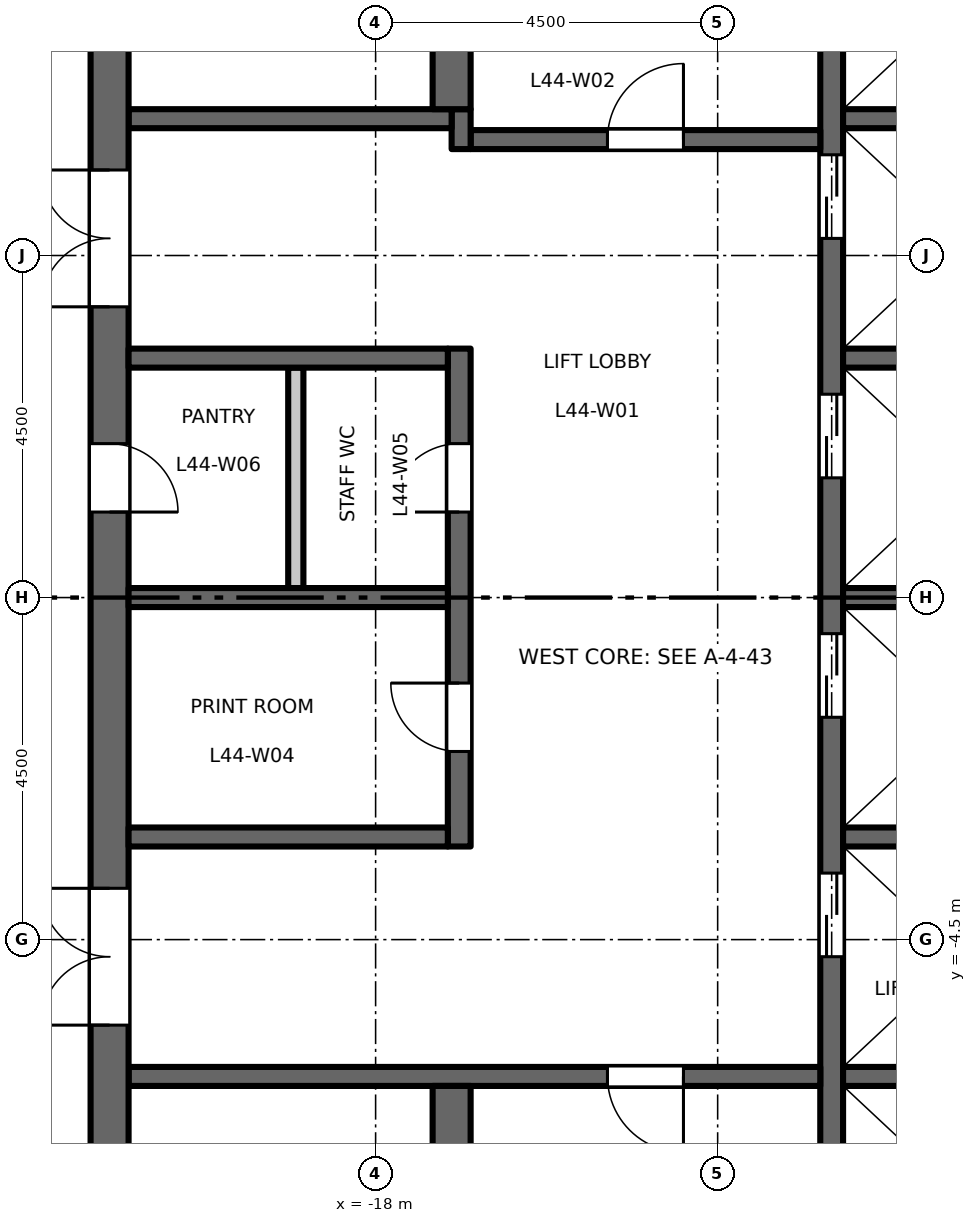
"""IFC4 building model, lengths in metres.
Left out: names, types, materials, properties, quantities, classifications, styles, units other than length and angle.
Written with IfcOpenShell. Run it as: python <this file> out.ifc"""

import sys

from ifc_helpers import new_model, si_unit, direction, frame, frame_2d, origin, place, context, subcontext, project, spatial, rectangle, extrude, element, fill, save


model = new_model("IFC4")
c1 = context("Model", 3, precision=1e-05, world=origin(), true_north=direction((0.0, 1.0)))
c2 = subcontext(c1, "Body", "Model", "MODEL_VIEW")
j1 = project(units=[si_unit("LENGTHUNIT", "METRE"), si_unit("PLANEANGLEUNIT", "RADIAN")], contexts=[c1])
p1 = place(None, origin())
s1 = spatial("IfcSite", under=j1, at=p1, CompositionType="ELEMENT")
p2 = place(p1, origin())
s2 = spatial("IfcBuilding", under=s1, at=p2, CompositionType="ELEMENT")
p3 = place(p2, frame((0.0, 0.0, 206.2)))
s3 = spatial("IfcBuildingStorey", under=s2, at=p3, CompositionType="ELEMENT", Elevation=206.2)
p4 = place(p3, frame((-12.0, -9.45, 0.0), z_axis=(0.0, 0.0, 1.0), x_axis=(0.0, 1.0, 0.0)))
e1 = element("IfcWall", 1, at=p4, inside=s3, PredefinedType="SHEAR", context=c2, shape_type="SweptSolid", body=[
    extrude(rectangle(XDim=18.9, YDim=0.3, at=frame_2d((9.45, 0.0))), origin(), (0.0, 0.0, 1.0), 4.35),
])
p5 = place(p4, frame((4.725, 0.0, 0.0)))
e2 = element("IfcOpeningElement", 2, at=p5, cuts=e1, PredefinedType="OPENING", context=c2, shape_type="SweptSolid", body=[
    extrude(rectangle(XDim=1.1, YDim=2.1, at=frame_2d((0.55, 1.05))), frame((0.0, 0.16, 0.0), z_axis=(0.0, -1.0, 0.0), x_axis=(1.0, 0.0, 0.0)), (0.0, 0.0, 1.0), 0.32),
])
p6 = place(p4, frame((7.875, 0.0, 0.0)))
e3 = element("IfcOpeningElement", 3, at=p6, cuts=e1, PredefinedType="OPENING", context=c2, shape_type="SweptSolid", body=[
    extrude(rectangle(XDim=1.1, YDim=2.1, at=frame_2d((0.55, 1.05))), frame((0.0, 0.16, 0.0), z_axis=(0.0, -1.0, 0.0), x_axis=(1.0, 0.0, 0.0)), (0.0, 0.0, 1.0), 0.32),
])
p7 = place(p4, frame((11.025, 0.0, 0.0)))
e4 = element("IfcOpeningElement", 4, at=p7, cuts=e1, PredefinedType="OPENING", context=c2, shape_type="SweptSolid", body=[
    extrude(rectangle(XDim=1.1, YDim=2.1, at=frame_2d((0.55, 1.05))), frame((0.0, 0.16, 0.0), z_axis=(0.0, -1.0, 0.0), x_axis=(1.0, 0.0, 0.0)), (0.0, 0.0, 1.0), 0.32),
])
p8 = place(p4, frame((14.175, 0.0, 0.0)))
e5 = element("IfcOpeningElement", 5, at=p8, cuts=e1, PredefinedType="OPENING", context=c2, shape_type="SweptSolid", body=[
    extrude(rectangle(XDim=1.1, YDim=2.1, at=frame_2d((0.55, 1.05))), frame((0.0, 0.16, 0.0), z_axis=(0.0, -1.0, 0.0), x_axis=(1.0, 0.0, 0.0)), (0.0, 0.0, 1.0), 0.32),
])
p9 = place(p4, frame((16.725, 0.0, 0.0)))
e6 = element("IfcOpeningElement", 6, at=p9, cuts=e1, PredefinedType="OPENING", context=c2, shape_type="SweptSolid", body=[
    extrude(rectangle(XDim=1.2, YDim=2.1, at=frame_2d((0.6, 1.05))), frame((0.0, 0.16, 0.0), z_axis=(0.0, -1.0, 0.0), x_axis=(1.0, 0.0, 0.0)), (0.0, 0.0, 1.0), 0.32),
])
p10 = place(p4, frame((0.975, 0.0, 0.0)))
e7 = element("IfcOpeningElement", 7, at=p10, cuts=e1, PredefinedType="OPENING", context=c2, shape_type="SweptSolid", body=[
    extrude(rectangle(XDim=1.2, YDim=2.1, at=frame_2d((0.6, 1.05))), frame((0.0, 0.16, 0.0), z_axis=(0.0, -1.0, 0.0), x_axis=(1.0, 0.0, 0.0)), (0.0, 0.0, 1.0), 0.32),
])
p11 = place(p3, frame((-12.15, 6.025, 0.0), z_axis=(0.0, 0.0, 1.0), x_axis=(-1.0, 0.0, 0.0)))
e8 = element("IfcWall", 8, at=p11, inside=s3, PredefinedType="SHEAR", context=c2, shape_type="SweptSolid", body=[
    extrude(rectangle(XDim=4.6, YDim=0.25, at=frame_2d((2.3, 0.0))), origin(), (0.0, 0.0, 1.0), 4.35),
])
p12 = place(p11, frame((1.8, 0.0, 0.0)))
e9 = element("IfcOpeningElement", 9, at=p12, cuts=e8, PredefinedType="OPENING", context=c2, shape_type="SweptSolid", body=[
    extrude(rectangle(XDim=1.0, YDim=2.1, at=frame_2d((0.5, 1.05))), frame((0.0, 0.135, 0.0), z_axis=(0.0, -1.0, 0.0), x_axis=(1.0, 0.0, 0.0)), (0.0, 0.0, 1.0), 0.27),
])
p13 = place(p3, frame((-16.875, 5.9, 0.0), z_axis=(0.0, 0.0, 1.0), x_axis=(0.0, 1.0, 0.0)))
e10 = element("IfcWall", 10, at=p13, inside=s3, PredefinedType="SHEAR", context=c2, shape_type="SweptSolid", body=[
    extrude(rectangle(XDim=0.525, YDim=0.25, at=frame_2d((0.263, 0.0))), origin(), (0.0, 0.0, 1.0), 4.35),
])
p14 = place(p3, frame((-17.0, 6.3, 0.0), z_axis=(0.0, 0.0, 1.0), x_axis=(-1.0, 0.0, 0.0)))
e11 = element("IfcWall", 11, at=p14, inside=s3, PredefinedType="SHEAR", context=c2, shape_type="SweptSolid", body=[
    extrude(rectangle(XDim=4.25, YDim=0.25, at=frame_2d((2.125, 0.0))), origin(), (0.0, 0.0, 1.0), 4.35),
])
p15 = place(p3, frame((-12.15, -6.3, 0.0), z_axis=(0.0, 0.0, 1.0), x_axis=(-1.0, 0.0, 0.0)))
e12 = element("IfcWall", 12, at=p15, inside=s3, PredefinedType="SHEAR", context=c2, shape_type="SweptSolid", body=[
    extrude(rectangle(XDim=9.1, YDim=0.25, at=frame_2d((4.55, 0.0))), origin(), (0.0, 0.0, 1.0), 4.35),
])
p16 = place(p15, frame((1.8, 0.0, 0.0)))
e13 = element("IfcOpeningElement", 13, at=p16, cuts=e12, PredefinedType="OPENING", context=c2, shape_type="SweptSolid", body=[
    extrude(rectangle(XDim=1.0, YDim=2.1, at=frame_2d((0.5, 1.05))), frame((0.0, 0.135, 0.0), z_axis=(0.0, -1.0, 0.0), x_axis=(1.0, 0.0, 0.0)), (0.0, 0.0, 1.0), 0.27),
])
p17 = place(p3, frame((-21.5, -13.0, 0.0), z_axis=(0.0, 0.0, 1.0), x_axis=(0.0, 1.0, 0.0)))
e14 = element("IfcWall", 14, at=p17, inside=s3, PredefinedType="SHEAR", context=c2, shape_type="SweptSolid", body=[
    extrude(rectangle(XDim=26.0, YDim=0.5, at=frame_2d((13.0, 0.0))), origin(), (0.0, 0.0, 1.0), 4.35),
])
p18 = place(p17, frame((16.825, 0.0, 0.0)))
e15 = element("IfcOpeningElement", 15, at=p18, cuts=e14, PredefinedType="OPENING", context=c2, shape_type="SweptSolid", body=[
    extrude(rectangle(XDim=1.8, YDim=2.1, at=frame_2d((0.9, 1.05))), frame((0.0, 0.26, 0.0), z_axis=(0.0, -1.0, 0.0), x_axis=(1.0, 0.0, 0.0)), (0.0, 0.0, 1.0), 0.52),
])
p19 = place(p17, frame((7.375, 0.0, 0.0)))
e16 = element("IfcOpeningElement", 16, at=p19, cuts=e14, PredefinedType="OPENING", context=c2, shape_type="SweptSolid", body=[
    extrude(rectangle(XDim=1.8, YDim=2.1, at=frame_2d((0.9, 1.05))), frame((0.0, 0.26, 0.0), z_axis=(0.0, -1.0, 0.0), x_axis=(1.0, 0.0, 0.0)), (0.0, 0.0, 1.0), 0.52),
])
p20 = place(p17, frame((14.125, 0.0, 0.0)))
e17 = element("IfcOpeningElement", 17, at=p20, cuts=e14, PredefinedType="OPENING", context=c2, shape_type="SweptSolid", body=[
    extrude(rectangle(XDim=0.9, YDim=2.1, at=frame_2d((0.45, 1.05))), frame((0.0, 0.26, 0.0), z_axis=(0.0, -1.0, 0.0), x_axis=(1.0, 0.0, 0.0)), (0.0, 0.0, 1.0), 0.52),
])
p21 = place(p3, frame((-16.9, -3.275, 0.0), z_axis=(0.0, 0.0, 1.0), x_axis=(0.0, 1.0, 0.0)))
e18 = element("IfcWall", 18, at=p21, inside=s3, PredefinedType="SHEAR", context=c2, shape_type="SweptSolid", body=[
    extrude(rectangle(XDim=6.55, YDim=0.3, at=frame_2d((3.275, 0.0))), origin(), (0.0, 0.0, 1.0), 4.35),
])
p22 = place(p21, frame((1.25, 0.0, 0.0)))
e19 = element("IfcOpeningElement", 19, at=p22, cuts=e18, PredefinedType="OPENING", context=c2, shape_type="SweptSolid", body=[
    extrude(rectangle(XDim=0.9, YDim=2.1, at=frame_2d((0.45, 1.05))), frame((0.0, 0.16, 0.0), z_axis=(0.0, -1.0, 0.0), x_axis=(1.0, 0.0, 0.0)), (0.0, 0.0, 1.0), 0.32),
])
p23 = place(p21, frame((4.4, 0.0, 0.0)))
e20 = element("IfcOpeningElement", 20, at=p23, cuts=e18, PredefinedType="OPENING", context=c2, shape_type="SweptSolid", body=[
    extrude(rectangle(XDim=0.9, YDim=2.1, at=frame_2d((0.45, 1.05))), frame((0.0, 0.16, 0.0), z_axis=(0.0, -1.0, 0.0), x_axis=(1.0, 0.0, 0.0)), (0.0, 0.0, 1.0), 0.32),
])
for number, where, z_axis, x_axis in (
    (21, (-17.05, 0.0, 0.0), (0.0, 0.0, 1.0), (-1.0, 0.0, 0.0)),
    (22, (-17.05, 3.15, 0.0), (0.0, 0.0, 1.0), (-1.0, 0.0, 0.0)),
    (23, (-17.05, -3.15, 0.0), (0.0, 0.0, 1.0), (-1.0, 0.0, 0.0)),
):
    element("IfcWall", number, at=place(p3, frame(where, z_axis=z_axis, x_axis=x_axis)), inside=s3, PredefinedType="SHEAR", context=c2, shape_type="SweptSolid", body=[
        extrude(rectangle(XDim=4.2, YDim=0.25, at=frame_2d((2.1, 0.0))), origin(), (0.0, 0.0, 1.0), 4.35),
    ])
p24 = place(p3, frame((-19.05, 0.125, 0.0), z_axis=(0.0, 0.0, 1.0), x_axis=(0.0, 1.0, 0.0)))
e24 = element("IfcWall", 24, at=p24, inside=s3, PredefinedType="PARTITIONING", context=c2, shape_type="SweptSolid", body=[
    extrude(rectangle(XDim=2.9, YDim=0.2, at=frame_2d((1.45, 0.0))), origin(), (0.0, 0.0, 1.0), 4.35),
])
for number, where, z_axis, x_axis in (
    (25, (-17.0, 6.425, 0.0), (0.0, 0.0, 1.0), (0.0, 1.0, 0.0)),
    (26, (-17.0, -13.0, 0.0), (0.0, 0.0, 1.0), (0.0, 1.0, 0.0)),
):
    element("IfcWall", number, at=place(p3, frame(where, z_axis=z_axis, x_axis=x_axis)), inside=s3, PredefinedType="SHEAR", context=c2, shape_type="SweptSolid", body=[
        extrude(rectangle(XDim=6.575, YDim=0.5, at=frame_2d((3.288, 0.0))), origin(), (0.0, 0.0, 1.0), 4.35),
    ])
for number, where, z_axis, x_axis in (
    (27, (-8.75, 0.0, 0.0), (0.0, 0.0, 1.0), (-1.0, 0.0, 0.0)),
    (28, (-8.75, 3.15, 0.0), (0.0, 0.0, 1.0), (-1.0, 0.0, 0.0)),
    (29, (-8.75, 6.3, 0.0), (0.0, 0.0, 1.0), (-1.0, 0.0, 0.0)),
    (30, (-8.75, -3.15, 0.0), (0.0, 0.0, 1.0), (-1.0, 0.0, 0.0)),
    (31, (-8.75, -6.3, 0.0), (0.0, 0.0, 1.0), (-1.0, 0.0, 0.0)),
):
    element("IfcWall", number, at=place(p3, frame(where, z_axis=z_axis, x_axis=x_axis)), inside=s3, PredefinedType="SHEAR", context=c2, shape_type="SweptSolid", body=[
        extrude(rectangle(XDim=3.1, YDim=0.25, at=frame_2d((1.55, 0.0))), origin(), (0.0, 0.0, 1.0), 4.35),
    ])
p25 = place(p12, origin())
e32 = element("IfcDoor", 32, at=p25, inside=s3, OperationType="SINGLE_SWING_LEFT", PredefinedType="DOOR", context=c2, shape_type="SweptSolid", body=[
    extrude(rectangle(XDim=1.0, YDim=2.1, at=frame_2d((0.5, 1.05))), frame((0.0, 0.025, 0.0), z_axis=(0.0, -1.0, 0.0), x_axis=(1.0, 0.0, 0.0)), (0.0, 0.0, 1.0), 0.05),
])
fill(e9, e32)
p26 = place(p16, origin())
e33 = element("IfcDoor", 33, at=p26, inside=s3, OperationType="SINGLE_SWING_RIGHT", PredefinedType="DOOR", context=c2, shape_type="SweptSolid", body=[
    extrude(rectangle(XDim=1.0, YDim=2.1, at=frame_2d((0.5, 1.05))), frame((0.0, 0.025, 0.0), z_axis=(0.0, -1.0, 0.0), x_axis=(1.0, 0.0, 0.0)), (0.0, 0.0, 1.0), 0.05),
])
fill(e13, e33)
p27 = place(p18, origin())
e34 = element("IfcDoor", 34, at=p27, inside=s3, OperationType="DOUBLE_DOOR_DOUBLE_SWING", PredefinedType="DOOR", context=c2, shape_type="SweptSolid", body=[
    extrude(rectangle(XDim=1.8, YDim=2.1, at=frame_2d((0.9, 1.05))), frame((0.0, 0.025, 0.0), z_axis=(0.0, -1.0, 0.0), x_axis=(1.0, 0.0, 0.0)), (0.0, 0.0, 1.0), 0.05),
])
fill(e15, e34)
p28 = place(p19, origin())
e35 = element("IfcDoor", 35, at=p28, inside=s3, OperationType="DOUBLE_DOOR_DOUBLE_SWING", PredefinedType="DOOR", context=c2, shape_type="SweptSolid", body=[
    extrude(rectangle(XDim=1.8, YDim=2.1, at=frame_2d((0.9, 1.05))), frame((0.0, 0.025, 0.0), z_axis=(0.0, -1.0, 0.0), x_axis=(1.0, 0.0, 0.0)), (0.0, 0.0, 1.0), 0.05),
])
fill(e16, e35)
p29 = place(p5, origin())
e36 = element("IfcDoor", 36, at=p29, inside=s3, OperationType="DOUBLE_DOOR_SLIDING", PredefinedType="DOOR", context=c2, shape_type="SweptSolid", body=[
    extrude(rectangle(XDim=1.1, YDim=2.1, at=frame_2d((0.55, 1.05))), frame((0.0, 0.025, 0.0), z_axis=(0.0, -1.0, 0.0), x_axis=(1.0, 0.0, 0.0)), (0.0, 0.0, 1.0), 0.05),
])
fill(e2, e36)
p30 = place(p6, origin())
e37 = element("IfcDoor", 37, at=p30, inside=s3, OperationType="DOUBLE_DOOR_SLIDING", PredefinedType="DOOR", context=c2, shape_type="SweptSolid", body=[
    extrude(rectangle(XDim=1.1, YDim=2.1, at=frame_2d((0.55, 1.05))), frame((0.0, 0.025, 0.0), z_axis=(0.0, -1.0, 0.0), x_axis=(1.0, 0.0, 0.0)), (0.0, 0.0, 1.0), 0.05),
])
fill(e3, e37)
p31 = place(p7, origin())
e38 = element("IfcDoor", 38, at=p31, inside=s3, OperationType="DOUBLE_DOOR_SLIDING", PredefinedType="DOOR", context=c2, shape_type="SweptSolid", body=[
    extrude(rectangle(XDim=1.1, YDim=2.1, at=frame_2d((0.55, 1.05))), frame((0.0, 0.025, 0.0), z_axis=(0.0, -1.0, 0.0), x_axis=(1.0, 0.0, 0.0)), (0.0, 0.0, 1.0), 0.05),
])
fill(e4, e38)
p32 = place(p8, origin())
e39 = element("IfcDoor", 39, at=p32, inside=s3, OperationType="DOUBLE_DOOR_SLIDING", PredefinedType="DOOR", context=c2, shape_type="SweptSolid", body=[
    extrude(rectangle(XDim=1.1, YDim=2.1, at=frame_2d((0.55, 1.05))), frame((0.0, 0.025, 0.0), z_axis=(0.0, -1.0, 0.0), x_axis=(1.0, 0.0, 0.0)), (0.0, 0.0, 1.0), 0.05),
])
fill(e5, e39)
p33 = place(p22, origin())
e40 = element("IfcDoor", 40, at=p33, inside=s3, OperationType="SINGLE_SWING_LEFT", PredefinedType="DOOR", context=c2, shape_type="SweptSolid", body=[
    extrude(rectangle(XDim=0.9, YDim=2.1, at=frame_2d((0.45, 1.05))), frame((0.0, 0.025, 0.0), z_axis=(0.0, -1.0, 0.0), x_axis=(1.0, 0.0, 0.0)), (0.0, 0.0, 1.0), 0.05),
])
fill(e19, e40)
p34 = place(p23, origin())
e41 = element("IfcDoor", 41, at=p34, inside=s3, OperationType="SINGLE_SWING_RIGHT", PredefinedType="DOOR", context=c2, shape_type="SweptSolid", body=[
    extrude(rectangle(XDim=0.9, YDim=2.1, at=frame_2d((0.45, 1.05))), frame((0.0, 0.025, 0.0), z_axis=(0.0, -1.0, 0.0), x_axis=(1.0, 0.0, 0.0)), (0.0, 0.0, 1.0), 0.05),
])
fill(e20, e41)
p35 = place(p20, origin())
e42 = element("IfcDoor", 42, at=p35, inside=s3, OperationType="SINGLE_SWING_LEFT", PredefinedType="DOOR", context=c2, shape_type="SweptSolid", body=[
    extrude(rectangle(XDim=0.9, YDim=2.1, at=frame_2d((0.45, 1.05))), frame((0.0, 0.025, 0.0), z_axis=(0.0, -1.0, 0.0), x_axis=(1.0, 0.0, 0.0)), (0.0, 0.0, 1.0), 0.05),
])
fill(e17, e42)
save(model, sys.argv[1])
